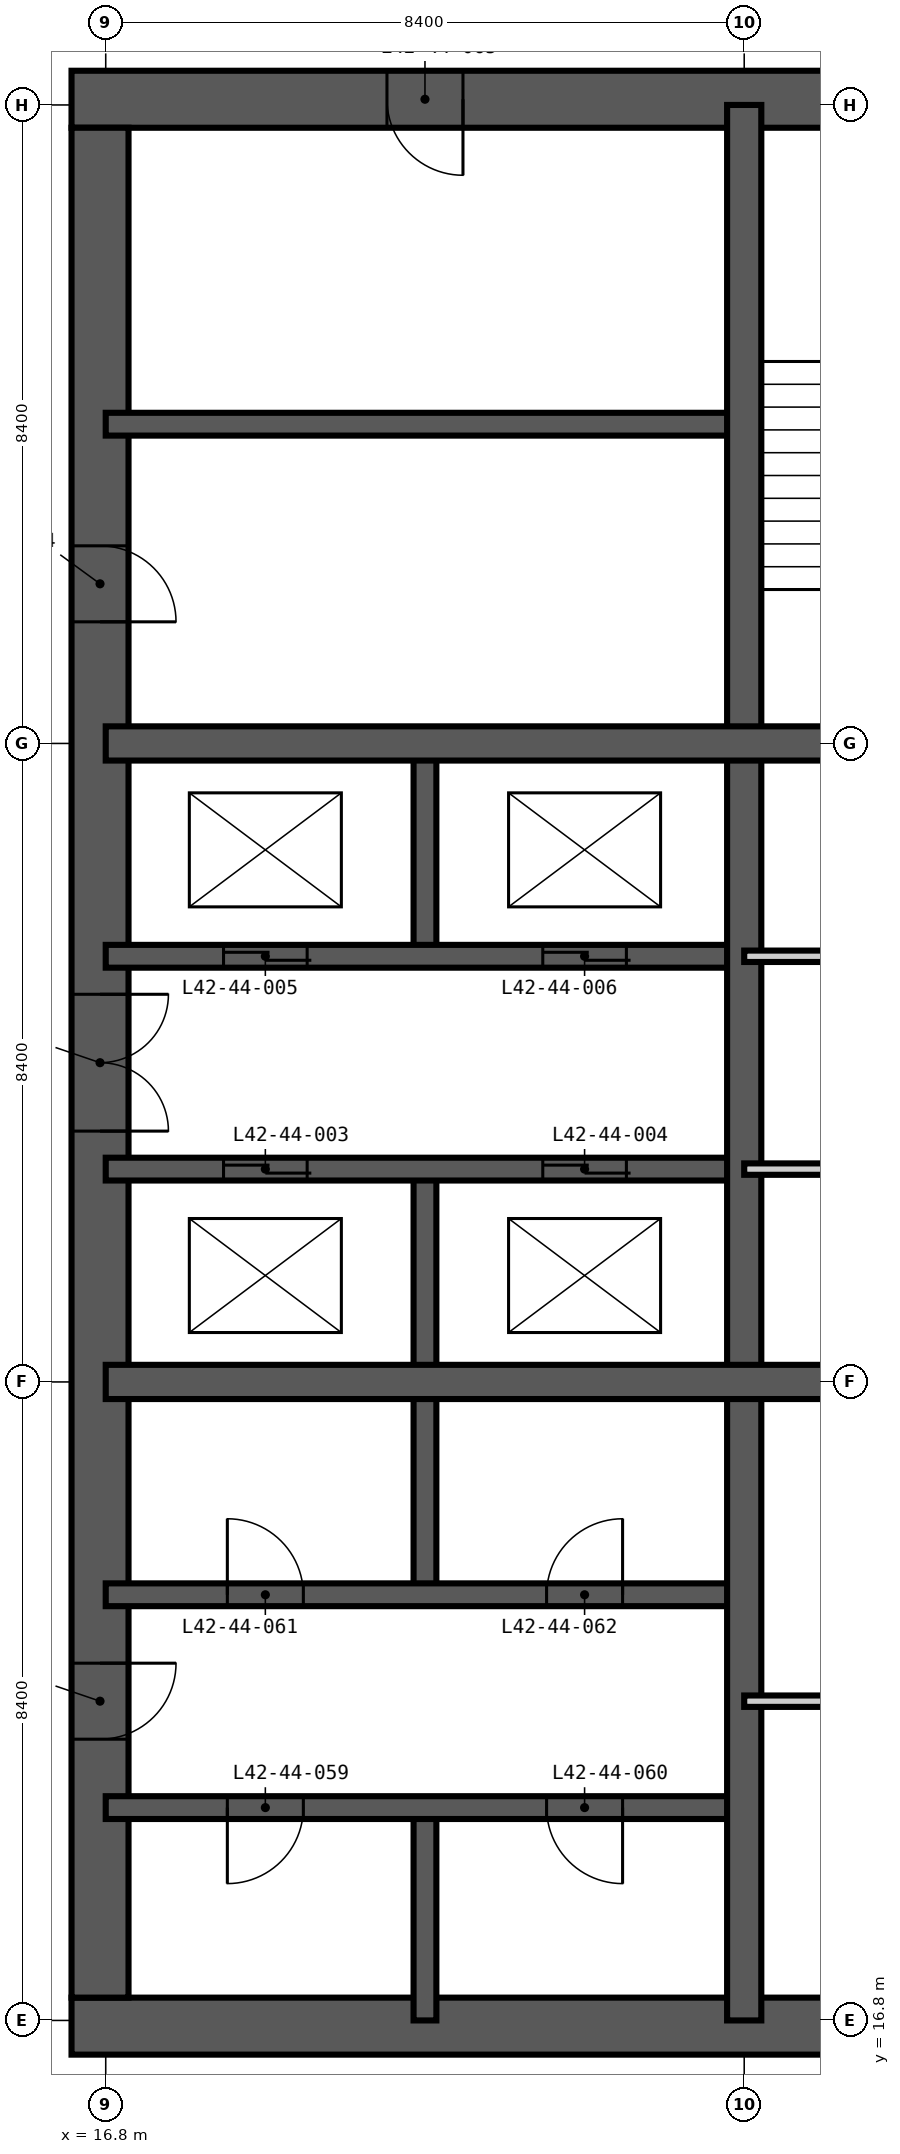
"""IFC4 building model, lengths in metres.
Left out: names, types, materials, properties, quantities, classifications, styles, units other than length and angle.
Written with IfcOpenShell. Run it as: python <this file> out.ifc"""

import sys

from ifc_helpers import new_model, si_unit, direction, frame, frame_2d, origin, place, context, subcontext, project, spatial, rectangle, extrude, element, fill, save


model = new_model("IFC4")
c1 = context("Model", 3, precision=1e-05, world=origin(), true_north=direction((0.0, 1.0)))
c2 = subcontext(c1, "Body", "Model", "MODEL_VIEW")
j1 = project(units=[si_unit("LENGTHUNIT", "METRE"), si_unit("PLANEANGLEUNIT", "RADIAN")], contexts=[c1])
p1 = place(None, origin())
s1 = spatial("IfcSite", under=j1, at=p1, CompositionType="ELEMENT")
p2 = place(p1, origin())
s2 = spatial("IfcBuilding", under=s1, at=p2, CompositionType="ELEMENT")
p3 = place(p2, frame((0.0, 0.0, 166.2)))
s3 = spatial("IfcBuildingStorey", under=s2, at=p3, CompositionType="ELEMENT", Elevation=166.2)
p4 = place(p3, frame((16.35, 16.725, -0.35), z_axis=(0.0, 0.0, 1.0), x_axis=(1.0, 0.0, 0.0)))
e1 = element("IfcWall", 1, at=p4, inside=s3, PredefinedType="SHEAR", context=c2, shape_type="SweptSolid", body=[
    extrude(rectangle(XDim=26.1, YDim=0.75, at=frame_2d((13.05, 0.0))), origin(), (0.0, 0.0, 1.0), 3.6),
])
p5 = place(p4, frame((12.55, 0.0, 0.35)))
e2 = element("IfcOpeningElement", 2, at=p5, cuts=e1, PredefinedType="OPENING", context=c2, shape_type="SweptSolid", body=[
    extrude(rectangle(XDim=1.0, YDim=2.1, at=frame_2d((0.5, 1.05))), frame((0.0, 0.385, 0.0), z_axis=(0.0, -1.0, 0.0), x_axis=(1.0, 0.0, 0.0)), (0.0, 0.0, 1.0), 0.77),
])
p6 = place(p4, frame((18.85, 0.0, 0.35)))
e3 = element("IfcOpeningElement", 3, at=p6, cuts=e1, PredefinedType="OPENING", context=c2, shape_type="SweptSolid", body=[
    extrude(rectangle(XDim=1.0, YDim=2.1, at=frame_2d((0.5, 1.05))), frame((0.0, 0.385, 0.0), z_axis=(0.0, -1.0, 0.0), x_axis=(1.0, 0.0, 0.0)), (0.0, 0.0, 1.0), 0.77),
])
p7 = place(p3, frame((42.45, 42.075, -0.35), z_axis=(0.0, 0.0, 1.0), x_axis=(-1.0, 0.0, 0.0)))
e4 = element("IfcWall", 4, at=p7, inside=s3, PredefinedType="SHEAR", context=c2, shape_type="SweptSolid", body=[
    extrude(rectangle(XDim=26.1, YDim=0.75, at=frame_2d((13.05, 0.0))), origin(), (0.0, 0.0, 1.0), 3.6),
])
p8 = place(p7, frame((20.95, 0.0, 0.35)))
e5 = element("IfcOpeningElement", 5, at=p8, cuts=e4, PredefinedType="OPENING", context=c2, shape_type="SweptSolid", body=[
    extrude(rectangle(XDim=1.0, YDim=2.1, at=frame_2d((0.5, 1.05))), frame((0.0, 0.385, 0.0), z_axis=(0.0, -1.0, 0.0), x_axis=(1.0, 0.0, 0.0)), (0.0, 0.0, 1.0), 0.77),
])
p9 = place(p7, frame((10.35, 0.0, 0.35)))
e6 = element("IfcOpeningElement", 6, at=p9, cuts=e4, PredefinedType="OPENING", context=c2, shape_type="SweptSolid", body=[
    extrude(rectangle(XDim=1.2, YDim=2.2, at=frame_2d((0.6, 1.1))), frame((0.0, 0.385, 0.0), z_axis=(0.0, -1.0, 0.0), x_axis=(1.0, 0.0, 0.0)), (0.0, 0.0, 1.0), 0.77),
])
p10 = place(p3, frame((16.725, 41.7, -0.35), z_axis=(0.0, 0.0, 1.0), x_axis=(0.0, -1.0, 0.0)))
e7 = element("IfcWall", 7, at=p10, inside=s3, PredefinedType="SHEAR", context=c2, shape_type="SweptSolid", body=[
    extrude(rectangle(XDim=24.6, YDim=0.75, at=frame_2d((12.3, 0.0))), origin(), (0.0, 0.0, 1.0), 3.6),
])
p11 = place(p10, frame((11.4, 0.0, 0.35)))
e8 = element("IfcOpeningElement", 8, at=p11, cuts=e7, PredefinedType="OPENING", context=c2, shape_type="SweptSolid", body=[
    extrude(rectangle(XDim=1.8, YDim=2.2, at=frame_2d((0.9, 1.1))), frame((0.0, 0.385, 0.0), z_axis=(0.0, -1.0, 0.0), x_axis=(1.0, 0.0, 0.0)), (0.0, 0.0, 1.0), 0.77),
])
p12 = place(p10, frame((20.2, 0.0, 0.35)))
e9 = element("IfcOpeningElement", 9, at=p12, cuts=e7, PredefinedType="OPENING", context=c2, shape_type="SweptSolid", body=[
    extrude(rectangle(XDim=1.0, YDim=2.1, at=frame_2d((0.5, 1.05))), frame((0.0, 0.385, 0.0), z_axis=(0.0, -1.0, 0.0), x_axis=(1.0, 0.0, 0.0)), (0.0, 0.0, 1.0), 0.77),
])
p13 = place(p10, frame((5.5, 0.0, 0.35)))
e10 = element("IfcOpeningElement", 10, at=p13, cuts=e7, PredefinedType="OPENING", context=c2, shape_type="SweptSolid", body=[
    extrude(rectangle(XDim=1.0, YDim=2.1, at=frame_2d((0.5, 1.05))), frame((0.0, 0.385, 0.0), z_axis=(0.0, -1.0, 0.0), x_axis=(1.0, 0.0, 0.0)), (0.0, 0.0, 1.0), 0.77),
])
p14 = place(p3, frame((21.0, 16.8, -0.35), z_axis=(0.0, 0.0, 1.0), x_axis=(0.0, 1.0, 0.0)))
e11 = element("IfcWall", 11, at=p14, inside=s3, PredefinedType="SHEAR", context=c2, shape_type="SweptSolid", body=[
    extrude(rectangle(XDim=2.8, YDim=0.3, at=frame_2d((1.4, 0.0))), origin(), (0.0, 0.0, 1.0), 3.6),
])
p15 = place(p3, frame((21.0, 22.4, -0.35), z_axis=(0.0, 0.0, 1.0), x_axis=(0.0, 1.0, 0.0)))
e12 = element("IfcWall", 12, at=p15, inside=s3, PredefinedType="SHEAR", context=c2, shape_type="SweptSolid", body=[
    extrude(rectangle(XDim=5.6, YDim=0.3, at=frame_2d((2.8, 0.0))), origin(), (0.0, 0.0, 1.0), 3.6),
])
p16 = place(p3, frame((21.0, 30.8, -0.35), z_axis=(0.0, 0.0, 1.0), x_axis=(0.0, 1.0, 0.0)))
e13 = element("IfcWall", 13, at=p16, inside=s3, PredefinedType="SHEAR", context=c2, shape_type="SweptSolid", body=[
    extrude(rectangle(XDim=2.8, YDim=0.3, at=frame_2d((1.4, 0.0))), origin(), (0.0, 0.0, 1.0), 3.6),
])
p17 = place(p3, frame((16.8, 19.6, -0.35), z_axis=(0.0, 0.0, 1.0), x_axis=(1.0, 0.0, 0.0)))
e14 = element("IfcWall", 14, at=p17, inside=s3, PredefinedType="SHEAR", context=c2, shape_type="SweptSolid", body=[
    extrude(rectangle(XDim=8.4, YDim=0.3, at=frame_2d((4.2, 0.0))), origin(), (0.0, 0.0, 1.0), 3.6),
])
p18 = place(p17, frame((1.6, 0.0, 0.35)))
e15 = element("IfcOpeningElement", 15, at=p18, cuts=e14, PredefinedType="OPENING", context=c2, shape_type="SweptSolid", body=[
    extrude(rectangle(XDim=1.0, YDim=2.1, at=frame_2d((0.5, 1.05))), frame((0.0, 0.16, 0.0), z_axis=(0.0, -1.0, 0.0), x_axis=(1.0, 0.0, 0.0)), (0.0, 0.0, 1.0), 0.32),
])
p19 = place(p17, frame((5.8, 0.0, 0.35)))
e16 = element("IfcOpeningElement", 16, at=p19, cuts=e14, PredefinedType="OPENING", context=c2, shape_type="SweptSolid", body=[
    extrude(rectangle(XDim=1.0, YDim=2.1, at=frame_2d((0.5, 1.05))), frame((0.0, 0.16, 0.0), z_axis=(0.0, -1.0, 0.0), x_axis=(1.0, 0.0, 0.0)), (0.0, 0.0, 1.0), 0.32),
])
p20 = place(p3, frame((16.8, 22.4, -0.35), z_axis=(0.0, 0.0, 1.0), x_axis=(1.0, 0.0, 0.0)))
e17 = element("IfcWall", 17, at=p20, inside=s3, PredefinedType="SHEAR", context=c2, shape_type="SweptSolid", body=[
    extrude(rectangle(XDim=8.4, YDim=0.3, at=frame_2d((4.2, 0.0))), origin(), (0.0, 0.0, 1.0), 3.6),
])
p21 = place(p20, frame((1.6, 0.0, 0.35)))
e18 = element("IfcOpeningElement", 18, at=p21, cuts=e17, PredefinedType="OPENING", context=c2, shape_type="SweptSolid", body=[
    extrude(rectangle(XDim=1.0, YDim=2.1, at=frame_2d((0.5, 1.05))), frame((0.0, 0.16, 0.0), z_axis=(0.0, -1.0, 0.0), x_axis=(1.0, 0.0, 0.0)), (0.0, 0.0, 1.0), 0.32),
])
p22 = place(p20, frame((5.8, 0.0, 0.35)))
e19 = element("IfcOpeningElement", 19, at=p22, cuts=e17, PredefinedType="OPENING", context=c2, shape_type="SweptSolid", body=[
    extrude(rectangle(XDim=1.0, YDim=2.1, at=frame_2d((0.5, 1.05))), frame((0.0, 0.16, 0.0), z_axis=(0.0, -1.0, 0.0), x_axis=(1.0, 0.0, 0.0)), (0.0, 0.0, 1.0), 0.32),
])
p23 = place(p3, frame((16.8, 28.0, -0.35), z_axis=(0.0, 0.0, 1.0), x_axis=(1.0, 0.0, 0.0)))
e20 = element("IfcWall", 20, at=p23, inside=s3, PredefinedType="SHEAR", context=c2, shape_type="SweptSolid", body=[
    extrude(rectangle(XDim=8.4, YDim=0.3, at=frame_2d((4.2, 0.0))), origin(), (0.0, 0.0, 1.0), 3.6),
])
p24 = place(p23, frame((1.55, 0.0, 0.35)))
e21 = element("IfcOpeningElement", 21, at=p24, cuts=e20, PredefinedType="OPENING", context=c2, shape_type="SweptSolid", body=[
    extrude(rectangle(XDim=1.1, YDim=2.2, at=frame_2d((0.55, 1.1))), frame((0.0, 0.16, 0.0), z_axis=(0.0, -1.0, 0.0), x_axis=(1.0, 0.0, 0.0)), (0.0, 0.0, 1.0), 0.32),
])
p25 = place(p23, frame((5.75, 0.0, 0.35)))
e22 = element("IfcOpeningElement", 22, at=p25, cuts=e20, PredefinedType="OPENING", context=c2, shape_type="SweptSolid", body=[
    extrude(rectangle(XDim=1.1, YDim=2.2, at=frame_2d((0.55, 1.1))), frame((0.0, 0.16, 0.0), z_axis=(0.0, -1.0, 0.0), x_axis=(1.0, 0.0, 0.0)), (0.0, 0.0, 1.0), 0.32),
])
p26 = place(p3, frame((16.8, 30.8, -0.35), z_axis=(0.0, 0.0, 1.0), x_axis=(1.0, 0.0, 0.0)))
e23 = element("IfcWall", 23, at=p26, inside=s3, PredefinedType="SHEAR", context=c2, shape_type="SweptSolid", body=[
    extrude(rectangle(XDim=8.4, YDim=0.3, at=frame_2d((4.2, 0.0))), origin(), (0.0, 0.0, 1.0), 3.6),
])
p27 = place(p26, frame((1.55, 0.0, 0.35)))
e24 = element("IfcOpeningElement", 24, at=p27, cuts=e23, PredefinedType="OPENING", context=c2, shape_type="SweptSolid", body=[
    extrude(rectangle(XDim=1.1, YDim=2.2, at=frame_2d((0.55, 1.1))), frame((0.0, 0.16, 0.0), z_axis=(0.0, -1.0, 0.0), x_axis=(1.0, 0.0, 0.0)), (0.0, 0.0, 1.0), 0.32),
])
p28 = place(p26, frame((5.75, 0.0, 0.35)))
e25 = element("IfcOpeningElement", 25, at=p28, cuts=e23, PredefinedType="OPENING", context=c2, shape_type="SweptSolid", body=[
    extrude(rectangle(XDim=1.1, YDim=2.2, at=frame_2d((0.55, 1.1))), frame((0.0, 0.16, 0.0), z_axis=(0.0, -1.0, 0.0), x_axis=(1.0, 0.0, 0.0)), (0.0, 0.0, 1.0), 0.32),
])
p29 = place(p3, frame((16.8, 37.8, -0.35), z_axis=(0.0, 0.0, 1.0), x_axis=(1.0, 0.0, 0.0)))
e26 = element("IfcWall", 26, at=p29, inside=s3, PredefinedType="SHEAR", context=c2, shape_type="SweptSolid", body=[
    extrude(rectangle(XDim=8.4, YDim=0.3, at=frame_2d((4.2, 0.0))), origin(), (0.0, 0.0, 1.0), 3.6),
])
for number, where, z_axis, x_axis in (
    (27, (25.2, 16.8, -0.35), (0.0, 0.0, 1.0), (0.0, 1.0, 0.0)),
    (28, (16.8, 25.2, -0.35), (0.0, 0.0, 1.0), (1.0, 0.0, 0.0)),
    (29, (16.8, 33.6, -0.35), (0.0, 0.0, 1.0), (1.0, 0.0, 0.0)),
):
    element("IfcWall", number, at=place(p3, frame(where, z_axis=z_axis, x_axis=x_axis)), inside=s3, PredefinedType="SHEAR", context=c2, shape_type="SweptSolid", body=[
        extrude(rectangle(XDim=25.2, YDim=0.45, at=frame_2d((12.6, 0.0))), origin(), (0.0, 0.0, 1.0), 3.6),
    ])
p30 = place(p3, frame((25.2, 21.0, 0.0), z_axis=(0.0, 0.0, 1.0), x_axis=(1.0, 0.0, 0.0)))
e30 = element("IfcWall", 30, at=p30, inside=s3, PredefinedType="PARTITIONING", context=c2, shape_type="SweptSolid", body=[
    extrude(rectangle(XDim=8.4, YDim=0.15, at=frame_2d((4.2, 0.0))), origin(), (0.0, 0.0, 1.0), 3.25),
])
p31 = place(p30, frame((3.7, 0.0, 0.0)))
e31 = element("IfcOpeningElement", 31, at=p31, cuts=e30, PredefinedType="OPENING", context=c2, shape_type="SweptSolid", body=[
    extrude(rectangle(XDim=1.0, YDim=2.1, at=frame_2d((0.5, 1.05))), frame((0.0, 0.085, 0.0), z_axis=(0.0, -1.0, 0.0), x_axis=(1.0, 0.0, 0.0)), (0.0, 0.0, 1.0), 0.17),
])
p32 = place(p3, frame((25.2, 28.0, 0.0), z_axis=(0.0, 0.0, 1.0), x_axis=(1.0, 0.0, 0.0)))
e32 = element("IfcWall", 32, at=p32, inside=s3, PredefinedType="PARTITIONING", context=c2, shape_type="SweptSolid", body=[
    extrude(rectangle(XDim=8.4, YDim=0.15, at=frame_2d((4.2, 0.0))), origin(), (0.0, 0.0, 1.0), 3.25),
])
p33 = place(p32, frame((3.7, 0.0, 0.0)))
e33 = element("IfcOpeningElement", 33, at=p33, cuts=e32, PredefinedType="OPENING", context=c2, shape_type="SweptSolid", body=[
    extrude(rectangle(XDim=1.0, YDim=2.1, at=frame_2d((0.5, 1.05))), frame((0.0, 0.085, 0.0), z_axis=(0.0, -1.0, 0.0), x_axis=(1.0, 0.0, 0.0)), (0.0, 0.0, 1.0), 0.17),
])
p34 = place(p3, frame((25.2, 30.8, 0.0), z_axis=(0.0, 0.0, 1.0), x_axis=(1.0, 0.0, 0.0)))
e34 = element("IfcWall", 34, at=p34, inside=s3, PredefinedType="PARTITIONING", context=c2, shape_type="SweptSolid", body=[
    extrude(rectangle(XDim=8.4, YDim=0.15, at=frame_2d((4.2, 0.0))), origin(), (0.0, 0.0, 1.0), 3.25),
])
p35 = place(p34, frame((5.8, 0.0, 0.0)))
e35 = element("IfcOpeningElement", 35, at=p35, cuts=e34, PredefinedType="OPENING", context=c2, shape_type="SweptSolid", body=[
    extrude(rectangle(XDim=1.0, YDim=2.1, at=frame_2d((0.5, 1.05))), frame((0.0, 0.085, 0.0), z_axis=(0.0, -1.0, 0.0), x_axis=(1.0, 0.0, 0.0)), (0.0, 0.0, 1.0), 0.17),
])
p36 = place(p34, frame((1.6, 0.0, 0.0)))
e36 = element("IfcOpeningElement", 36, at=p36, cuts=e34, PredefinedType="OPENING", context=c2, shape_type="SweptSolid", body=[
    extrude(rectangle(XDim=1.0, YDim=2.1, at=frame_2d((0.5, 1.05))), frame((0.0, 0.085, 0.0), z_axis=(0.0, -1.0, 0.0), x_axis=(1.0, 0.0, 0.0)), (0.0, 0.0, 1.0), 0.17),
])
p37 = place(p24, origin())
e37 = element("IfcDoor", 37, at=p37, inside=s3, OperationType="DOUBLE_DOOR_SLIDING", PredefinedType="DOOR", context=c2, shape_type="SweptSolid", body=[
    extrude(rectangle(XDim=1.1, YDim=2.2, at=frame_2d((0.55, 1.1))), frame((0.0, 0.025, 0.0), z_axis=(0.0, -1.0, 0.0), x_axis=(1.0, 0.0, 0.0)), (0.0, 0.0, 1.0), 0.05),
])
fill(e21, e37)
p38 = place(p25, origin())
e38 = element("IfcDoor", 38, at=p38, inside=s3, OperationType="DOUBLE_DOOR_SLIDING", PredefinedType="DOOR", context=c2, shape_type="SweptSolid", body=[
    extrude(rectangle(XDim=1.1, YDim=2.2, at=frame_2d((0.55, 1.1))), frame((0.0, 0.025, 0.0), z_axis=(0.0, -1.0, 0.0), x_axis=(1.0, 0.0, 0.0)), (0.0, 0.0, 1.0), 0.05),
])
fill(e22, e38)
p39 = place(p27, origin())
e39 = element("IfcDoor", 39, at=p39, inside=s3, OperationType="DOUBLE_DOOR_SLIDING", PredefinedType="DOOR", context=c2, shape_type="SweptSolid", body=[
    extrude(rectangle(XDim=1.1, YDim=2.2, at=frame_2d((0.55, 1.1))), frame((0.0, 0.025, 0.0), z_axis=(0.0, -1.0, 0.0), x_axis=(1.0, 0.0, 0.0)), (0.0, 0.0, 1.0), 0.05),
])
fill(e24, e39)
p40 = place(p28, origin())
e40 = element("IfcDoor", 40, at=p40, inside=s3, OperationType="DOUBLE_DOOR_SLIDING", PredefinedType="DOOR", context=c2, shape_type="SweptSolid", body=[
    extrude(rectangle(XDim=1.1, YDim=2.2, at=frame_2d((0.55, 1.1))), frame((0.0, 0.025, 0.0), z_axis=(0.0, -1.0, 0.0), x_axis=(1.0, 0.0, 0.0)), (0.0, 0.0, 1.0), 0.05),
])
fill(e25, e40)
p41 = place(p11, origin())
e41 = element("IfcDoor", 41, at=p41, inside=s3, OperationType="DOUBLE_DOOR_DOUBLE_SWING", PredefinedType="DOOR", context=c2, shape_type="SweptSolid", body=[
    extrude(rectangle(XDim=1.8, YDim=2.2, at=frame_2d((0.9, 1.1))), frame((0.0, 0.025, 0.0), z_axis=(0.0, -1.0, 0.0), x_axis=(1.0, 0.0, 0.0)), (0.0, 0.0, 1.0), 0.05),
])
fill(e8, e41)
p42 = place(p18, frame((1.0, 0.0, 0.0), z_axis=(0.0, 0.0, 1.0), x_axis=(-1.0, 0.0, 0.0)))
e42 = element("IfcDoor", 42, at=p42, inside=s3, OperationType="SINGLE_SWING_RIGHT", PredefinedType="DOOR", context=c2, shape_type="SweptSolid", body=[
    extrude(rectangle(XDim=1.0, YDim=2.1, at=frame_2d((0.5, 1.05))), frame((0.0, 0.025, 0.0), z_axis=(0.0, -1.0, 0.0), x_axis=(1.0, 0.0, 0.0)), (0.0, 0.0, 1.0), 0.05),
])
fill(e15, e42)
p43 = place(p19, frame((1.0, 0.0, 0.0), z_axis=(0.0, 0.0, 1.0), x_axis=(-1.0, 0.0, 0.0)))
e43 = element("IfcDoor", 43, at=p43, inside=s3, OperationType="SINGLE_SWING_LEFT", PredefinedType="DOOR", context=c2, shape_type="SweptSolid", body=[
    extrude(rectangle(XDim=1.0, YDim=2.1, at=frame_2d((0.5, 1.05))), frame((0.0, 0.025, 0.0), z_axis=(0.0, -1.0, 0.0), x_axis=(1.0, 0.0, 0.0)), (0.0, 0.0, 1.0), 0.05),
])
fill(e16, e43)
p44 = place(p21, origin())
e44 = element("IfcDoor", 44, at=p44, inside=s3, OperationType="SINGLE_SWING_LEFT", PredefinedType="DOOR", context=c2, shape_type="SweptSolid", body=[
    extrude(rectangle(XDim=1.0, YDim=2.1, at=frame_2d((0.5, 1.05))), frame((0.0, 0.025, 0.0), z_axis=(0.0, -1.0, 0.0), x_axis=(1.0, 0.0, 0.0)), (0.0, 0.0, 1.0), 0.05),
])
fill(e18, e44)
p45 = place(p22, origin())
e45 = element("IfcDoor", 45, at=p45, inside=s3, OperationType="SINGLE_SWING_RIGHT", PredefinedType="DOOR", context=c2, shape_type="SweptSolid", body=[
    extrude(rectangle(XDim=1.0, YDim=2.1, at=frame_2d((0.5, 1.05))), frame((0.0, 0.025, 0.0), z_axis=(0.0, -1.0, 0.0), x_axis=(1.0, 0.0, 0.0)), (0.0, 0.0, 1.0), 0.05),
])
fill(e19, e45)
p46 = place(p12, origin())
e46 = element("IfcDoor", 46, at=p46, inside=s3, OperationType="SINGLE_SWING_LEFT", PredefinedType="DOOR", context=c2, shape_type="SweptSolid", body=[
    extrude(rectangle(XDim=1.0, YDim=2.1, at=frame_2d((0.5, 1.05))), frame((0.0, 0.025, 0.0), z_axis=(0.0, -1.0, 0.0), x_axis=(1.0, 0.0, 0.0)), (0.0, 0.0, 1.0), 0.05),
])
fill(e9, e46)
p47 = place(p13, origin())
e47 = element("IfcDoor", 47, at=p47, inside=s3, OperationType="SINGLE_SWING_RIGHT", PredefinedType="DOOR", context=c2, shape_type="SweptSolid", body=[
    extrude(rectangle(XDim=1.0, YDim=2.1, at=frame_2d((0.5, 1.05))), frame((0.0, 0.025, 0.0), z_axis=(0.0, -1.0, 0.0), x_axis=(1.0, 0.0, 0.0)), (0.0, 0.0, 1.0), 0.05),
])
fill(e10, e47)
p48 = place(p8, origin())
e48 = element("IfcDoor", 48, at=p48, inside=s3, OperationType="SINGLE_SWING_LEFT", PredefinedType="DOOR", context=c2, shape_type="SweptSolid", body=[
    extrude(rectangle(XDim=1.0, YDim=2.1, at=frame_2d((0.5, 1.05))), frame((0.0, 0.025, 0.0), z_axis=(0.0, -1.0, 0.0), x_axis=(1.0, 0.0, 0.0)), (0.0, 0.0, 1.0), 0.05),
])
fill(e5, e48)
save(model, sys.argv[1])
